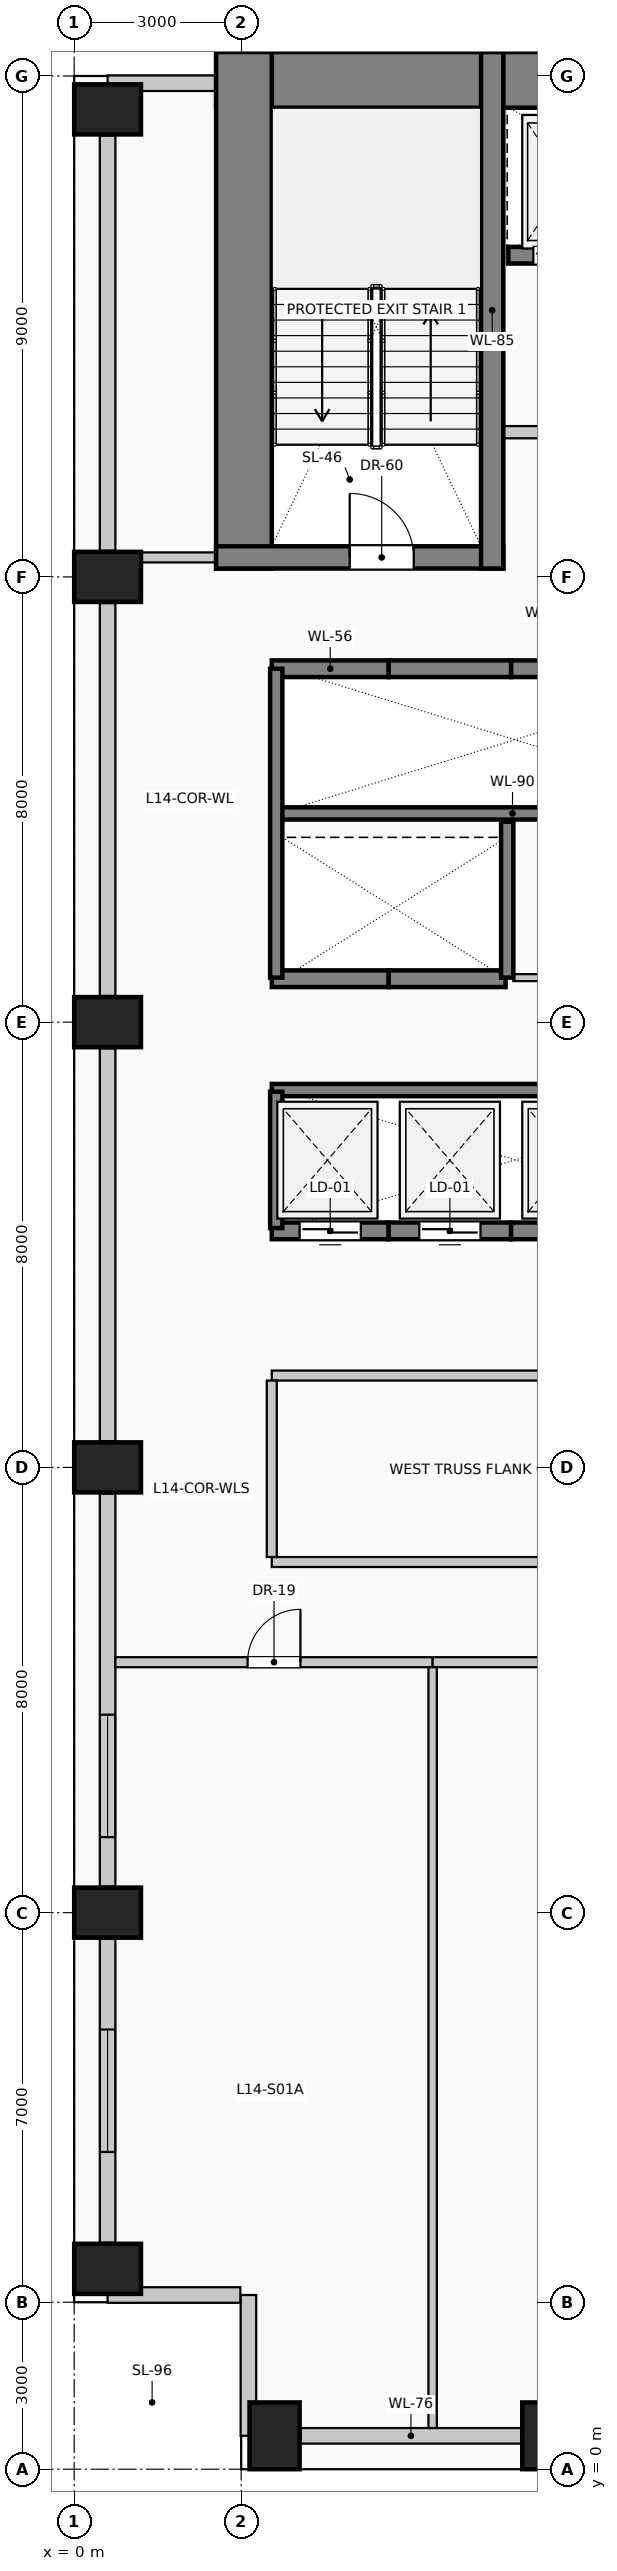
"""IFC4 building model, lengths in metres.
Left out: names, types, materials, properties, quantities, classifications, styles, units other than length and angle.
Written with IfcOpenShell. Run it as: python <this file> out.ifc"""

import sys

from ifc_helpers import new_model, si_unit, direction, frame, frame_2d, origin, origin_2d, place, context, subcontext, project, spatial, rectangle, extrude, element, fill, save


model = new_model("IFC4")
c1 = context("Model", 3, precision=1e-05, world=origin(), true_north=direction((0.0, 1.0)))
c2 = subcontext(c1, "Body", "Model", "MODEL_VIEW")
j1 = project(units=[si_unit("LENGTHUNIT", "METRE"), si_unit("PLANEANGLEUNIT", "RADIAN")], contexts=[c1])
p1 = place(None, origin())
s1 = spatial("IfcSite", under=j1, at=p1, CompositionType="ELEMENT")
p2 = place(p1, origin())
s2 = spatial("IfcBuilding", under=s1, at=p2, CompositionType="ELEMENT")
p3 = place(p2, frame((0.0, 0.0, 58.6)))
s3 = spatial("IfcBuildingStorey", under=s2, at=p3, CompositionType="ELEMENT", Elevation=58.6)
p4 = place(p3, frame((2.55, 42.93, 0.0), z_axis=(0.0, 0.0, 1.0), x_axis=(1.0, 0.0, 0.0)))
e1 = element("IfcWall", 1, at=p4, inside=s3, PredefinedType="SHEAR", context=c2, shape_type="SweptSolid", body=[
    extrude(rectangle(XDim=14.9, YDim=1.0, at=frame_2d((7.45, 0.0))), origin(), (0.0, 0.0, 1.0), 4.0),
])
p5 = place(p3, frame((3.05, 34.15, 0.0), z_axis=(0.0, 0.0, 1.0), x_axis=(0.0, 1.0, 0.0)))
e2 = element("IfcWall", 2, at=p5, inside=s3, PredefinedType="SHEAR", context=c2, shape_type="SweptSolid", body=[
    extrude(rectangle(XDim=9.28, YDim=1.0, at=frame_2d((4.64, 0.0))), origin(), (0.0, 0.0, 1.0), 4.0),
])
p6 = place(p3, frame((2.55, 34.35, 0.0), z_axis=(0.0, 0.0, 1.0), x_axis=(1.0, 0.0, 0.0)))
e3 = element("IfcWall", 3, at=p6, inside=s3, PredefinedType="SHEAR", context=c2, shape_type="SweptSolid", body=[
    extrude(rectangle(XDim=5.16, YDim=0.4, at=frame_2d((2.58, 0.0))), origin(), (0.0, 0.0, 1.0), 4.0),
])
p7 = place(p6, frame((2.4, 0.0, 0.0)))
e4 = element("IfcOpeningElement", 4, at=p7, cuts=e3, PredefinedType="OPENING", context=c2, shape_type="SweptSolid", body=[
    extrude(rectangle(XDim=1.15, YDim=2.2, at=frame_2d((0.575, 1.1))), frame((0.0, 0.21, 0.0), z_axis=(0.0, -1.0, 0.0), x_axis=(1.0, 0.0, 0.0)), (0.0, 0.0, 1.0), 0.42),
])
p8 = place(p3, frame((7.51, 34.15, 0.0), z_axis=(0.0, 0.0, 1.0), x_axis=(0.0, 1.0, 0.0)))
e5 = element("IfcWall", 5, at=p8, inside=s3, PredefinedType="SHEAR", context=c2, shape_type="SweptSolid", body=[
    extrude(rectangle(XDim=9.28, YDim=0.4, at=frame_2d((4.64, 0.0))), origin(), (0.0, 0.0, 1.0), 4.0),
])
for number, where, z_axis, x_axis in (
    (6, (3.6, 0.6, 0.0), (0.0, 0.0, 1.0), (1.0, 0.0, 0.0)),
    (7, (8.5, 0.6, 0.0), (0.0, 0.0, 1.0), (1.0, 0.0, 0.0)),
    (8, (0.6, 3.6, 0.0), (0.0, 0.0, 1.0), (0.0, 1.0, 0.0)),
    (9, (0.6, 10.0, 0.0), (0.0, 0.0, 1.0), (0.0, 1.0, 0.0)),
    (10, (0.6, 18.0, 0.0), (0.0, 0.0, 1.0), (0.0, 1.0, 0.0)),
    (11, (0.6, 26.0, 0.0), (0.0, 0.0, 1.0), (0.0, 1.0, 0.0)),
    (12, (0.6, 34.0, 0.0), (0.0, 0.0, 1.0), (0.0, 1.0, 0.0)),
    (13, (0.6, 42.4, 0.0), (0.0, 0.0, 1.0), (0.0, 1.0, 0.0)),
):
    element("IfcColumn", number, at=place(p3, frame(where, z_axis=z_axis, x_axis=x_axis)), inside=s3, PredefinedType="COLUMN", context=c2, shape_type="SweptSolid", body=[
        extrude(rectangle(XDim=0.9, YDim=1.2, at=origin_2d()), origin(), (0.0, 0.0, 1.0), 4.0),
    ])
p9 = place(p3, frame((8.03, 0.6, 0.0), z_axis=(0.0, 0.0, 1.0), x_axis=(-1.0, 0.0, 0.0)))
e14 = element("IfcWall", 14, at=p9, inside=s3, PredefinedType="SOLIDWALL", context=c2, shape_type="SweptSolid", body=[
    extrude(rectangle(XDim=3.96, YDim=0.28, at=frame_2d((1.98, 0.0))), origin(), (0.0, 0.0, 1.0), 2.85),
])
p10 = place(p3, frame((0.6, 4.07, 0.0), z_axis=(0.0, 0.0, 1.0), x_axis=(0.0, 1.0, 0.0)))
e15 = element("IfcWall", 15, at=p10, inside=s3, PredefinedType="SOLIDWALL", context=c2, shape_type="SweptSolid", body=[
    extrude(rectangle(XDim=5.46, YDim=0.28, at=frame_2d((2.73, 0.0))), origin(), (0.0, 0.0, 1.0), 2.85),
])
p11 = place(p10, frame((1.63, 0.0, 0.5)))
e16 = element("IfcOpeningElement", 16, at=p11, cuts=e15, PredefinedType="OPENING", context=c2, shape_type="SweptSolid", body=[
    extrude(rectangle(XDim=2.2, YDim=1.95, at=frame_2d((1.1, 0.975))), frame((0.0, 0.15, 0.0), z_axis=(0.0, -1.0, 0.0), x_axis=(1.0, 0.0, 0.0)), (0.0, 0.0, 1.0), 0.3),
])
p12 = place(p3, frame((0.6, 10.47, 0.0), z_axis=(0.0, 0.0, 1.0), x_axis=(0.0, 1.0, 0.0)))
e17 = element("IfcWall", 17, at=p12, inside=s3, PredefinedType="SOLIDWALL", context=c2, shape_type="SweptSolid", body=[
    extrude(rectangle(XDim=7.06, YDim=0.28, at=frame_2d((3.53, 0.0))), origin(), (0.0, 0.0, 1.0), 2.85),
])
p13 = place(p12, frame((0.887, 0.0, 0.5)))
e18 = element("IfcOpeningElement", 18, at=p13, cuts=e17, PredefinedType="OPENING", context=c2, shape_type="SweptSolid", body=[
    extrude(rectangle(XDim=2.2, YDim=1.95, at=frame_2d((1.1, 0.975))), frame((0.0, 0.15, 0.0), z_axis=(0.0, -1.0, 0.0), x_axis=(1.0, 0.0, 0.0)), (0.0, 0.0, 1.0), 0.3),
])
for number, where, z_axis, x_axis in (
    (19, (0.6, 18.47, 0.0), (0.0, 0.0, 1.0), (0.0, 1.0, 0.0)),
    (20, (0.6, 26.47, 0.0), (0.0, 0.0, 1.0), (0.0, 1.0, 0.0)),
):
    element("IfcWall", number, at=place(p3, frame(where, z_axis=z_axis, x_axis=x_axis)), inside=s3, PredefinedType="SOLIDWALL", context=c2, shape_type="SweptSolid", body=[
        extrude(rectangle(XDim=7.06, YDim=0.28, at=frame_2d((3.53, 0.0))), origin(), (0.0, 0.0, 1.0), 2.85),
    ])
p14 = place(p3, frame((0.6, 34.47, 0.0), z_axis=(0.0, 0.0, 1.0), x_axis=(0.0, 1.0, 0.0)))
e21 = element("IfcWall", 21, at=p14, inside=s3, PredefinedType="SOLIDWALL", context=c2, shape_type="SweptSolid", body=[
    extrude(rectangle(XDim=7.46, YDim=0.28, at=frame_2d((3.73, 0.0))), origin(), (0.0, 0.0, 1.0), 2.85),
])
p15 = place(p3, frame((0.6, 42.87, 0.0), z_axis=(0.0, 0.0, 1.0), x_axis=(1.0, 0.0, 0.0)))
e22 = element("IfcWall", 22, at=p15, inside=s3, PredefinedType="SOLIDWALL", context=c2, shape_type="SweptSolid", body=[
    extrude(rectangle(XDim=1.945, YDim=0.28, at=frame_2d((0.972, 0.0))), origin(), (0.0, 0.0, 1.0), 3.7),
])
p16 = place(p3, frame((3.13, 0.6, 0.0), z_axis=(0.0, 0.0, 1.0), x_axis=(0.0, 1.0, 0.0)))
e23 = element("IfcWall", 23, at=p16, inside=s3, PredefinedType="SOLIDWALL", context=c2, shape_type="SweptSolid", body=[
    extrude(rectangle(XDim=2.53, YDim=0.28, at=frame_2d((1.265, 0.0))), origin(), (0.0, 0.0, 1.0), 3.7),
])
p17 = place(p3, frame((2.985, 3.13, 0.0), z_axis=(0.0, 0.0, 1.0), x_axis=(-1.0, 0.0, 0.0)))
e24 = element("IfcWall", 24, at=p17, inside=s3, PredefinedType="SOLIDWALL", context=c2, shape_type="SweptSolid", body=[
    extrude(rectangle(XDim=2.385, YDim=0.28, at=frame_2d((1.192, 0.0))), origin(), (0.0, 0.0, 1.0), 3.7),
])
p18 = place(p3, frame((5.65, 22.25, 0.0), z_axis=(0.0, 0.0, 1.0), x_axis=(-1.0, 0.0, 0.0)))
e25 = element("IfcWall", 25, at=p18, inside=s3, PredefinedType="SOLIDWALL", context=c2, shape_type="SweptSolid", body=[
    extrude(rectangle(XDim=2.1, YDim=0.3, at=frame_2d((1.05, 0.0))), origin(), (0.0, 0.0, 1.0), 4.0),
])
p19 = place(p18, frame((0.5, 0.0, 0.0)))
e26 = element("IfcOpeningElement", 26, at=p19, cuts=e25, PredefinedType="OPENING", context=c2, shape_type="SweptSolid", body=[
    extrude(rectangle(XDim=1.1, YDim=2.2, at=frame_2d((0.55, 1.1))), frame((0.0, 0.16, 0.0), z_axis=(0.0, -1.0, 0.0), x_axis=(1.0, 0.0, 0.0)), (0.0, 0.0, 1.0), 0.32),
])
p20 = place(p3, frame((7.85, 22.25, 0.0), z_axis=(0.0, 0.0, 1.0), x_axis=(-1.0, 0.0, 0.0)))
e27 = element("IfcWall", 27, at=p20, inside=s3, PredefinedType="SOLIDWALL", context=c2, shape_type="SweptSolid", body=[
    extrude(rectangle(XDim=2.2, YDim=0.3, at=frame_2d((1.1, 0.0))), origin(), (0.0, 0.0, 1.0), 4.0),
])
p21 = place(p20, frame((0.55, 0.0, 0.0)))
e28 = element("IfcOpeningElement", 28, at=p21, cuts=e27, PredefinedType="OPENING", context=c2, shape_type="SweptSolid", body=[
    extrude(rectangle(XDim=1.1, YDim=2.2, at=frame_2d((0.55, 1.1))), frame((0.0, 0.16, 0.0), z_axis=(0.0, -1.0, 0.0), x_axis=(1.0, 0.0, 0.0)), (0.0, 0.0, 1.0), 0.32),
])
p22 = place(p3, frame((10.05, 22.25, 0.0), z_axis=(0.0, 0.0, 1.0), x_axis=(-1.0, 0.0, 0.0)))
e29 = element("IfcWall", 29, at=p22, inside=s3, PredefinedType="SOLIDWALL", context=c2, shape_type="SweptSolid", body=[
    extrude(rectangle(XDim=2.2, YDim=0.3, at=frame_2d((1.1, 0.0))), origin(), (0.0, 0.0, 1.0), 4.0),
])
p23 = place(p22, frame((0.55, 0.0, 0.0)))
e30 = element("IfcOpeningElement", 30, at=p23, cuts=e29, PredefinedType="OPENING", context=c2, shape_type="SweptSolid", body=[
    extrude(rectangle(XDim=1.1, YDim=2.2, at=frame_2d((0.55, 1.1))), frame((0.0, 0.16, 0.0), z_axis=(0.0, -1.0, 0.0), x_axis=(1.0, 0.0, 0.0)), (0.0, 0.0, 1.0), 0.32),
])
p24 = place(p3, frame((3.55, 32.35, 0.0), z_axis=(0.0, 0.0, 1.0), x_axis=(1.0, 0.0, 0.0)))
e31 = element("IfcWall", 31, at=p24, inside=s3, PredefinedType="SOLIDWALL", context=c2, shape_type="SweptSolid", body=[
    extrude(rectangle(XDim=2.1, YDim=0.3, at=frame_2d((1.05, 0.0))), origin(), (0.0, 0.0, 1.0), 4.0),
])
p25 = place(p3, frame((5.65, 32.35, 0.0), z_axis=(0.0, 0.0, 1.0), x_axis=(1.0, 0.0, 0.0)))
e32 = element("IfcWall", 32, at=p25, inside=s3, PredefinedType="SOLIDWALL", context=c2, shape_type="SweptSolid", body=[
    extrude(rectangle(XDim=2.2, YDim=0.3, at=frame_2d((1.1, 0.0))), origin(), (0.0, 0.0, 1.0), 4.0),
])
p26 = place(p3, frame((7.85, 32.35, 0.0), z_axis=(0.0, 0.0, 1.0), x_axis=(1.0, 0.0, 0.0)))
e33 = element("IfcWall", 33, at=p26, inside=s3, PredefinedType="SOLIDWALL", context=c2, shape_type="SweptSolid", body=[
    extrude(rectangle(XDim=2.2, YDim=0.3, at=frame_2d((1.1, 0.0))), origin(), (0.0, 0.0, 1.0), 4.0),
])
p27 = place(p3, frame((5.65, 26.78, 0.0), z_axis=(0.0, 0.0, 1.0), x_axis=(-1.0, 0.0, 0.0)))
e34 = element("IfcWall", 34, at=p27, inside=s3, PredefinedType="SOLIDWALL", context=c2, shape_type="SweptSolid", body=[
    extrude(rectangle(XDim=2.1, YDim=0.3, at=frame_2d((1.05, 0.0))), origin(), (0.0, 0.0, 1.0), 4.0),
])
p28 = place(p3, frame((7.75, 26.78, 0.0), z_axis=(0.0, 0.0, 1.0), x_axis=(-1.0, 0.0, 0.0)))
e35 = element("IfcWall", 35, at=p28, inside=s3, PredefinedType="SOLIDWALL", context=c2, shape_type="SweptSolid", body=[
    extrude(rectangle(XDim=2.1, YDim=0.3, at=frame_2d((1.05, 0.0))), origin(), (0.0, 0.0, 1.0), 4.0),
])
p29 = place(p3, frame((10.0, 39.78, 0.0), z_axis=(0.0, 0.0, 1.0), x_axis=(-1.0, 0.0, 0.0)))
e36 = element("IfcWall", 36, at=p29, inside=s3, PredefinedType="SOLIDWALL", context=c2, shape_type="SweptSolid", body=[
    extrude(rectangle(XDim=2.2, YDim=0.3, at=frame_2d((1.1, 0.0))), origin(), (0.0, 0.0, 1.0), 4.0),
])
p30 = place(p29, frame((0.45, 0.0, 0.0)))
e37 = element("IfcOpeningElement", 37, at=p30, cuts=e36, PredefinedType="OPENING", context=c2, shape_type="SweptSolid", body=[
    extrude(rectangle(XDim=1.3, YDim=2.25, at=frame_2d((0.65, 1.125))), frame((0.0, 0.16, 0.0), z_axis=(0.0, -1.0, 0.0), x_axis=(1.0, 0.0, 0.0)), (0.0, 0.0, 1.0), 0.32),
])
p31 = place(p3, frame((3.55, 29.75, 0.0), z_axis=(0.0, 0.0, 1.0), x_axis=(1.0, 0.0, 0.0)))
e38 = element("IfcWall", 38, at=p31, inside=s3, PredefinedType="SOLIDWALL", context=c2, shape_type="SweptSolid", body=[
    extrude(rectangle(XDim=8.65, YDim=0.22, at=frame_2d((4.325, 0.0))), origin(), (0.0, 0.0, 1.0), 4.0),
])
p32 = place(p3, frame((3.63, 26.8, 0.0), z_axis=(0.0, 0.0, 1.0), x_axis=(0.0, 1.0, 0.0)))
e39 = element("IfcWall", 39, at=p32, inside=s3, PredefinedType="SOLIDWALL", context=c2, shape_type="SweptSolid", body=[
    extrude(rectangle(XDim=5.55, YDim=0.22, at=frame_2d((2.775, 0.0))), origin(), (0.0, 0.0, 1.0), 4.0),
])
p33 = place(p3, frame((7.78, 26.8, 0.0), z_axis=(0.0, 0.0, 1.0), x_axis=(0.0, 1.0, 0.0)))
e40 = element("IfcWall", 40, at=p33, inside=s3, PredefinedType="SOLIDWALL", context=c2, shape_type="SweptSolid", body=[
    extrude(rectangle(XDim=2.8, YDim=0.22, at=frame_2d((1.4, 0.0))), origin(), (0.0, 0.0, 1.0), 4.0),
])
p34 = place(p3, frame((3.55, 24.78, 0.0), z_axis=(0.0, 0.0, 1.0), x_axis=(1.0, 0.0, 0.0)))
e41 = element("IfcWall", 41, at=p34, inside=s3, PredefinedType="SOLIDWALL", context=c2, shape_type="SweptSolid", body=[
    extrude(rectangle(XDim=8.65, YDim=0.22, at=frame_2d((4.325, 0.0))), origin(), (0.0, 0.0, 1.0), 4.0),
])
p35 = place(p3, frame((3.63, 22.3, 0.0), z_axis=(0.0, 0.0, 1.0), x_axis=(0.0, 1.0, 0.0)))
e42 = element("IfcWall", 42, at=p35, inside=s3, PredefinedType="SOLIDWALL", context=c2, shape_type="SweptSolid", body=[
    extrude(rectangle(XDim=2.45, YDim=0.22, at=frame_2d((1.225, 0.0))), origin(), (0.0, 0.0, 1.0), 4.0),
])
p36 = place(p3, frame((7.51, 36.6, 0.0), z_axis=(0.0, 0.0, 1.0), x_axis=(1.0, 0.0, 0.0)))
e43 = element("IfcWall", 43, at=p36, inside=s3, PredefinedType="PARTITIONING", context=c2, shape_type="SweptSolid", body=[
    extrude(rectangle(XDim=4.98, YDim=0.22, at=frame_2d((2.49, 0.0))), origin(), (0.0, 0.0, 1.0), 3.7),
])
p37 = place(p36, frame((1.94, 0.0, 0.0)))
e44 = element("IfcOpeningElement", 44, at=p37, cuts=e43, PredefinedType="OPENING", context=c2, shape_type="SweptSolid", body=[
    extrude(rectangle(XDim=1.1, YDim=2.2, at=frame_2d((0.55, 1.1))), frame((0.0, 0.12, 0.0), z_axis=(0.0, -1.0, 0.0), x_axis=(1.0, 0.0, 0.0)), (0.0, 0.0, 1.0), 0.24),
])
p38 = place(p3, frame((0.74, 14.5, 0.0), z_axis=(0.0, 0.0, 1.0), x_axis=(1.0, 0.0, 0.0)))
e45 = element("IfcWall", 45, at=p38, inside=s3, PredefinedType="PARTITIONING", context=c2, shape_type="SweptSolid", body=[
    extrude(rectangle(XDim=5.7, YDim=0.18, at=frame_2d((2.85, 0.0))), origin(), (0.0, 0.0, 1.0), 3.7),
])
p39 = place(p38, frame((2.375, 0.0, 0.0)))
e46 = element("IfcOpeningElement", 46, at=p39, cuts=e45, PredefinedType="OPENING", context=c2, shape_type="SweptSolid", body=[
    extrude(rectangle(XDim=0.95, YDim=2.15, at=frame_2d((0.475, 1.075))), frame((0.0, 0.1, 0.0), z_axis=(0.0, -1.0, 0.0), x_axis=(1.0, 0.0, 0.0)), (0.0, 0.0, 1.0), 0.2),
])
p40 = place(p3, frame((6.44, 14.5, 0.0), z_axis=(0.0, 0.0, 1.0), x_axis=(1.0, 0.0, 0.0)))
e47 = element("IfcWall", 47, at=p40, inside=s3, PredefinedType="PARTITIONING", context=c2, shape_type="SweptSolid", body=[
    extrude(rectangle(XDim=8.76, YDim=0.18, at=frame_2d((4.38, 0.0))), origin(), (0.0, 0.0, 1.0), 3.7),
])
p41 = place(p40, frame((3.855, 0.0, 0.0)))
e48 = element("IfcOpeningElement", 48, at=p41, cuts=e47, PredefinedType="OPENING", context=c2, shape_type="SweptSolid", body=[
    extrude(rectangle(XDim=1.05, YDim=2.15, at=frame_2d((0.525, 1.075))), frame((0.0, 0.1, 0.0), z_axis=(0.0, -1.0, 0.0), x_axis=(1.0, 0.0, 0.0)), (0.0, 0.0, 1.0), 0.2),
])
p42 = place(p3, frame((3.55, 16.3, 0.0), z_axis=(0.0, 0.0, 1.0), x_axis=(1.0, 0.0, 0.0)))
e49 = element("IfcWall", 49, at=p42, inside=s3, PredefinedType="PARTITIONING", context=c2, shape_type="SweptSolid", body=[
    extrude(rectangle(XDim=12.1, YDim=0.18, at=frame_2d((6.05, 0.0))), origin(), (0.0, 0.0, 1.0), 3.7),
])
p43 = place(p42, frame((5.575, 0.0, 0.0)))
e50 = element("IfcOpeningElement", 50, at=p43, cuts=e49, PredefinedType="OPENING", context=c2, shape_type="SweptSolid", body=[
    extrude(rectangle(XDim=0.95, YDim=2.15, at=frame_2d((0.475, 1.075))), frame((0.0, 0.1, 0.0), z_axis=(0.0, -1.0, 0.0), x_axis=(1.0, 0.0, 0.0)), (0.0, 0.0, 1.0), 0.2),
])
p44 = place(p3, frame((3.55, 19.65, 0.0), z_axis=(0.0, 0.0, 1.0), x_axis=(1.0, 0.0, 0.0)))
e51 = element("IfcWall", 51, at=p44, inside=s3, PredefinedType="PARTITIONING", context=c2, shape_type="SweptSolid", body=[
    extrude(rectangle(XDim=12.1, YDim=0.18, at=frame_2d((6.05, 0.0))), origin(), (0.0, 0.0, 1.0), 3.7),
])
p45 = place(p3, frame((7.89, 26.8, 0.0), z_axis=(0.0, 0.0, 1.0), x_axis=(1.0, 0.0, 0.0)))
e52 = element("IfcWall", 52, at=p45, inside=s3, PredefinedType="PARTITIONING", context=c2, shape_type="SweptSolid", body=[
    extrude(rectangle(XDim=4.16, YDim=0.125, at=frame_2d((2.08, 0.0))), origin(), (0.0, 0.0, 1.0), 3.7),
])
p46 = place(p45, frame((1.62, 0.0, 0.0)))
e53 = element("IfcOpeningElement", 53, at=p46, cuts=e52, PredefinedType="OPENING", context=c2, shape_type="SweptSolid", body=[
    extrude(rectangle(XDim=0.92, YDim=2.1, at=frame_2d((0.46, 1.05))), frame((0.0, 0.073, 0.0), z_axis=(0.0, -1.0, 0.0), x_axis=(1.0, 0.0, 0.0)), (0.0, 0.0, 1.0), 0.145),
])
p47 = place(p3, frame((1.2, 34.35, 0.0), z_axis=(0.0, 0.0, 1.0), x_axis=(1.0, 0.0, 0.0)))
e54 = element("IfcWall", 54, at=p47, inside=s3, PredefinedType="PARTITIONING", context=c2, shape_type="SweptSolid", body=[
    extrude(rectangle(XDim=1.35, YDim=0.18, at=frame_2d((0.675, 0.0))), origin(), (0.0, 0.0, 1.0), 3.7),
])
p48 = place(p3, frame((3.55, 16.39, 0.0), z_axis=(0.0, 0.0, 1.0), x_axis=(0.0, 1.0, 0.0)))
e55 = element("IfcWall", 55, at=p48, inside=s3, PredefinedType="PARTITIONING", context=c2, shape_type="SweptSolid", body=[
    extrude(rectangle(XDim=3.17, YDim=0.18, at=frame_2d((1.585, 0.0))), origin(), (0.0, 0.0, 1.0), 3.7),
])
p49 = place(p3, frame((6.44, 0.74, 0.0), z_axis=(0.0, 0.0, 1.0), x_axis=(0.0, 1.0, 0.0)))
e56 = element("IfcWall", 56, at=p49, inside=s3, PredefinedType="PARTITIONING", context=c2, shape_type="SweptSolid", body=[
    extrude(rectangle(XDim=13.67, YDim=0.15, at=frame_2d((6.835, 0.0))), origin(), (0.0, 0.0, 1.0), 3.7),
])
p50 = place(p11, origin())
e57 = element("IfcWindow", 57, at=p50, inside=s3, PartitioningType="SINGLE_PANEL", PredefinedType="WINDOW", context=c2, shape_type="SweptSolid", body=[
    extrude(rectangle(XDim=2.2, YDim=1.95, at=frame_2d((1.1, 0.975))), frame((0.0, 0.03, 0.0), z_axis=(0.0, -1.0, 0.0), x_axis=(1.0, 0.0, 0.0)), (0.0, 0.0, 1.0), 0.06),
])
fill(e16, e57)
p51 = place(p13, origin())
e58 = element("IfcWindow", 58, at=p51, inside=s3, PartitioningType="SINGLE_PANEL", PredefinedType="WINDOW", context=c2, shape_type="SweptSolid", body=[
    extrude(rectangle(XDim=2.2, YDim=1.95, at=frame_2d((1.1, 0.975))), frame((0.0, 0.03, 0.0), z_axis=(0.0, -1.0, 0.0), x_axis=(1.0, 0.0, 0.0)), (0.0, 0.0, 1.0), 0.06),
])
fill(e18, e58)
p52 = place(p19, origin())
e59 = element("IfcDoor", 59, at=p52, inside=s3, OperationType="SLIDING_TO_LEFT", PredefinedType="DOOR", context=c2, shape_type="SweptSolid", body=[
    extrude(rectangle(XDim=1.1, YDim=2.2, at=frame_2d((0.55, 1.1))), frame((0.0, 0.025, 0.0), z_axis=(0.0, -1.0, 0.0), x_axis=(1.0, 0.0, 0.0)), (0.0, 0.0, 1.0), 0.05),
])
fill(e26, e59)
p53 = place(p21, origin())
e60 = element("IfcDoor", 60, at=p53, inside=s3, OperationType="SLIDING_TO_RIGHT", PredefinedType="DOOR", context=c2, shape_type="SweptSolid", body=[
    extrude(rectangle(XDim=1.1, YDim=2.2, at=frame_2d((0.55, 1.1))), frame((0.0, 0.025, 0.0), z_axis=(0.0, -1.0, 0.0), x_axis=(1.0, 0.0, 0.0)), (0.0, 0.0, 1.0), 0.05),
])
fill(e28, e60)
p54 = place(p30, origin())
e61 = element("IfcDoor", 61, at=p54, inside=s3, OperationType="SLIDING_TO_LEFT", PredefinedType="DOOR", context=c2, shape_type="SweptSolid", body=[
    extrude(rectangle(XDim=1.3, YDim=2.25, at=frame_2d((0.65, 1.125))), frame((0.0, 0.025, 0.0), z_axis=(0.0, -1.0, 0.0), x_axis=(1.0, 0.0, 0.0)), (0.0, 0.0, 1.0), 0.05),
])
fill(e37, e61)
p55 = place(p7, origin())
e62 = element("IfcDoor", 62, at=p55, inside=s3, OperationType="SINGLE_SWING_LEFT", PredefinedType="DOOR", context=c2, shape_type="SweptSolid", body=[
    extrude(rectangle(XDim=1.15, YDim=2.2, at=frame_2d((0.575, 1.1))), frame((0.0, 0.025, 0.0), z_axis=(0.0, -1.0, 0.0), x_axis=(1.0, 0.0, 0.0)), (0.0, 0.0, 1.0), 0.05),
])
fill(e4, e62)
p56 = place(p39, origin())
e63 = element("IfcDoor", 63, at=p56, inside=s3, OperationType="SINGLE_SWING_RIGHT", PredefinedType="DOOR", context=c2, shape_type="SweptSolid", body=[
    extrude(rectangle(XDim=0.95, YDim=2.15, at=frame_2d((0.475, 1.075))), frame((0.0, 0.025, 0.0), z_axis=(0.0, -1.0, 0.0), x_axis=(1.0, 0.0, 0.0)), (0.0, 0.0, 1.0), 0.05),
])
fill(e46, e63)
save(model, sys.argv[1])
